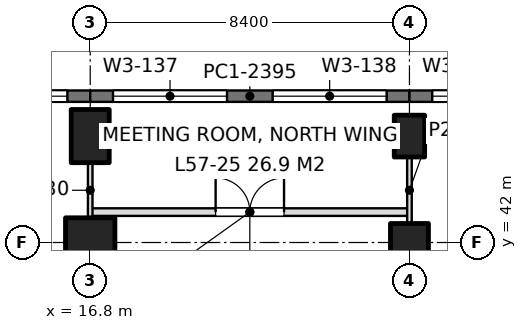
"""IFC4 building model, lengths in metres.
Left out: names, types, materials, properties, quantities, classifications, styles, units other than length and angle.
Written with IfcOpenShell. Run it as: python <this file> out.ifc"""

import sys

from ifc_helpers import new_model, si_unit, direction, frame, frame_2d, origin, origin_2d, place, context, subcontext, project, spatial, rectangle, extrude, element, fill, save


model = new_model("IFC4")
c1 = context("Model", 3, precision=1e-05, world=origin(), true_north=direction((0.0, 1.0)))
c2 = subcontext(c1, "Body", "Model", "MODEL_VIEW")
j1 = project(units=[si_unit("LENGTHUNIT", "METRE"), si_unit("PLANEANGLEUNIT", "RADIAN")], contexts=[c1])
p1 = place(None, origin())
s1 = spatial("IfcSite", under=j1, at=p1, CompositionType="ELEMENT")
p2 = place(p1, origin())
s2 = spatial("IfcBuilding", under=s1, at=p2, CompositionType="ELEMENT")
p3 = place(p2, frame((0.0, 0.0, 250.2)))
s3 = spatial("IfcBuildingStorey", under=s2, at=p3, CompositionType="ELEMENT", Elevation=250.2)
p4 = place(p3, frame((16.8, 42.0, 0.0), z_axis=(0.0, 0.0, 1.0), x_axis=(1.0, 0.0, 0.0)))
e1 = element("IfcColumn", 1, at=p4, inside=s3, PredefinedType="COLUMN", context=c2, shape_type="SweptSolid", body=[
    extrude(rectangle(XDim=1.3, YDim=1.3, at=origin_2d()), origin(), (0.0, 0.0, 1.0), 4.5),
])
p5 = place(p3, frame((16.8, 44.8, 0.0), z_axis=(0.0, 0.0, 1.0), x_axis=(1.0, 0.0, 0.0)))
e2 = element("IfcColumn", 2, at=p5, inside=s3, PredefinedType="COLUMN", context=c2, shape_type="SweptSolid", body=[
    extrude(rectangle(XDim=1.0, YDim=1.4, at=origin_2d()), origin(), (0.0, 0.0, 1.0), 4.5),
])
p6 = place(p3, frame((25.2, 42.0, 0.0), z_axis=(0.0, 0.0, 1.0), x_axis=(1.0, 0.0, 0.0)))
e3 = element("IfcColumn", 3, at=p6, inside=s3, PredefinedType="COLUMN", context=c2, shape_type="SweptSolid", body=[
    extrude(rectangle(XDim=1.0, YDim=1.0, at=origin_2d()), origin(), (0.0, 0.0, 1.0), 4.5),
])
p7 = place(p3, frame((25.2, 44.8, 0.0), z_axis=(0.0, 0.0, 1.0), x_axis=(1.0, 0.0, 0.0)))
e4 = element("IfcColumn", 4, at=p7, inside=s3, PredefinedType="COLUMN", context=c2, shape_type="SweptSolid", body=[
    extrude(rectangle(XDim=0.8, YDim=1.1, at=origin_2d()), origin(), (0.0, 0.0, 1.0), 4.5),
])
p8 = place(p3, frame((8.4, 45.85, 0.0), z_axis=(0.0, 0.0, 1.0), x_axis=(1.0, 0.0, 0.0)))
e5 = element("IfcWall", 5, at=p8, inside=s3, PredefinedType="SOLIDWALL", context=c2, shape_type="SweptSolid", body=[
    extrude(rectangle(XDim=8.4, YDim=0.3, at=frame_2d((4.2, 0.0))), origin(), (0.0, 0.0, 1.0), 4.35),
])
p9 = place(p8, frame((0.6, 0.0, 0.9)))
e6 = element("IfcOpeningElement", 6, at=p9, cuts=e5, PredefinedType="OPENING", context=c2, shape_type="SweptSolid", body=[
    extrude(rectangle(XDim=3.0, YDim=2.4, at=frame_2d((1.5, 1.2))), frame((0.0, 0.16, 0.0), z_axis=(0.0, -1.0, 0.0), x_axis=(1.0, 0.0, 0.0)), (0.0, 0.0, 1.0), 0.32),
])
p10 = place(p8, frame((4.8, 0.0, 0.9)))
e7 = element("IfcOpeningElement", 7, at=p10, cuts=e5, PredefinedType="OPENING", context=c2, shape_type="SweptSolid", body=[
    extrude(rectangle(XDim=3.0, YDim=2.4, at=frame_2d((1.5, 1.2))), frame((0.0, 0.16, 0.0), z_axis=(0.0, -1.0, 0.0), x_axis=(1.0, 0.0, 0.0)), (0.0, 0.0, 1.0), 0.32),
])
p11 = place(p3, frame((16.8, 45.85, 0.0), z_axis=(0.0, 0.0, 1.0), x_axis=(1.0, 0.0, 0.0)))
e8 = element("IfcWall", 8, at=p11, inside=s3, PredefinedType="SOLIDWALL", context=c2, shape_type="SweptSolid", body=[
    extrude(rectangle(XDim=8.4, YDim=0.3, at=frame_2d((4.2, 0.0))), origin(), (0.0, 0.0, 1.0), 4.35),
])
p12 = place(p11, frame((0.6, 0.0, 0.9)))
e9 = element("IfcOpeningElement", 9, at=p12, cuts=e8, PredefinedType="OPENING", context=c2, shape_type="SweptSolid", body=[
    extrude(rectangle(XDim=3.0, YDim=2.4, at=frame_2d((1.5, 1.2))), frame((0.0, 0.16, 0.0), z_axis=(0.0, -1.0, 0.0), x_axis=(1.0, 0.0, 0.0)), (0.0, 0.0, 1.0), 0.32),
])
p13 = place(p11, frame((4.8, 0.0, 0.9)))
e10 = element("IfcOpeningElement", 10, at=p13, cuts=e8, PredefinedType="OPENING", context=c2, shape_type="SweptSolid", body=[
    extrude(rectangle(XDim=3.0, YDim=2.4, at=frame_2d((1.5, 1.2))), frame((0.0, 0.16, 0.0), z_axis=(0.0, -1.0, 0.0), x_axis=(1.0, 0.0, 0.0)), (0.0, 0.0, 1.0), 0.32),
])
p14 = place(p3, frame((25.2, 45.85, 0.0), z_axis=(0.0, 0.0, 1.0), x_axis=(1.0, 0.0, 0.0)))
e11 = element("IfcWall", 11, at=p14, inside=s3, PredefinedType="SOLIDWALL", context=c2, shape_type="SweptSolid", body=[
    extrude(rectangle(XDim=8.4, YDim=0.3, at=frame_2d((4.2, 0.0))), origin(), (0.0, 0.0, 1.0), 4.35),
])
p15 = place(p14, frame((0.6, 0.0, 0.9)))
e12 = element("IfcOpeningElement", 12, at=p15, cuts=e11, PredefinedType="OPENING", context=c2, shape_type="SweptSolid", body=[
    extrude(rectangle(XDim=3.0, YDim=2.4, at=frame_2d((1.5, 1.2))), frame((0.0, 0.16, 0.0), z_axis=(0.0, -1.0, 0.0), x_axis=(1.0, 0.0, 0.0)), (0.0, 0.0, 1.0), 0.32),
])
p16 = place(p14, frame((4.8, 0.0, 0.9)))
e13 = element("IfcOpeningElement", 13, at=p16, cuts=e11, PredefinedType="OPENING", context=c2, shape_type="SweptSolid", body=[
    extrude(rectangle(XDim=3.0, YDim=2.4, at=frame_2d((1.5, 1.2))), frame((0.0, 0.16, 0.0), z_axis=(0.0, -1.0, 0.0), x_axis=(1.0, 0.0, 0.0)), (0.0, 0.0, 1.0), 0.32),
])
p17 = place(p3, frame((16.8, 42.8, 0.0), z_axis=(0.0, 0.0, 1.0), x_axis=(1.0, 0.0, 0.0)))
e14 = element("IfcWall", 14, at=p17, inside=s3, PredefinedType="PARTITIONING", context=c2, shape_type="SweptSolid", body=[
    extrude(rectangle(XDim=8.4, YDim=0.2, at=frame_2d((4.2, 0.0))), origin(), (0.0, 0.0, 1.0), 3.99),
])
p18 = place(p17, frame((3.3, 0.0, 0.0)))
e15 = element("IfcOpeningElement", 15, at=p18, cuts=e14, PredefinedType="OPENING", context=c2, shape_type="SweptSolid", body=[
    extrude(rectangle(XDim=1.8, YDim=2.2, at=frame_2d((0.9, 1.1))), frame((0.0, 0.11, 0.0), z_axis=(0.0, -1.0, 0.0), x_axis=(1.0, 0.0, 0.0)), (0.0, 0.0, 1.0), 0.22),
])
p19 = place(p3, frame((16.8, 42.648, 0.0), z_axis=(0.0, 0.0, 1.0), x_axis=(0.0, 1.0, 0.0)))
e16 = element("IfcWall", 16, at=p19, inside=s3, PredefinedType="PARTITIONING", context=c2, shape_type="SweptSolid", body=[
    extrude(rectangle(XDim=1.453, YDim=0.12, at=frame_2d((0.727, 0.0))), origin(), (0.0, 0.0, 1.0), 3.99),
])
p20 = place(p3, frame((25.2, 42.498, 0.0), z_axis=(0.0, 0.0, 1.0), x_axis=(0.0, 1.0, 0.0)))
e17 = element("IfcWall", 17, at=p20, inside=s3, PredefinedType="PARTITIONING", context=c2, shape_type="SweptSolid", body=[
    extrude(rectangle(XDim=1.753, YDim=0.12, at=frame_2d((0.876, 0.0))), origin(), (0.0, 0.0, 1.0), 3.99),
])
p21 = place(p10, origin())
e18 = element("IfcWindow", 18, at=p21, inside=s3, PartitioningType="SINGLE_PANEL", PredefinedType="WINDOW", context=c2, shape_type="SweptSolid", body=[
    extrude(rectangle(XDim=3.0, YDim=2.4, at=frame_2d((1.5, 1.2))), frame((0.0, 0.03, 0.0), z_axis=(0.0, -1.0, 0.0), x_axis=(1.0, 0.0, 0.0)), (0.0, 0.0, 1.0), 0.06),
])
fill(e7, e18)
p22 = place(p12, origin())
e19 = element("IfcWindow", 19, at=p22, inside=s3, PartitioningType="SINGLE_PANEL", PredefinedType="WINDOW", context=c2, shape_type="SweptSolid", body=[
    extrude(rectangle(XDim=3.0, YDim=2.4, at=frame_2d((1.5, 1.2))), frame((0.0, 0.03, 0.0), z_axis=(0.0, -1.0, 0.0), x_axis=(1.0, 0.0, 0.0)), (0.0, 0.0, 1.0), 0.06),
])
fill(e9, e19)
p23 = place(p13, origin())
e20 = element("IfcWindow", 20, at=p23, inside=s3, PartitioningType="SINGLE_PANEL", PredefinedType="WINDOW", context=c2, shape_type="SweptSolid", body=[
    extrude(rectangle(XDim=3.0, YDim=2.4, at=frame_2d((1.5, 1.2))), frame((0.0, 0.03, 0.0), z_axis=(0.0, -1.0, 0.0), x_axis=(1.0, 0.0, 0.0)), (0.0, 0.0, 1.0), 0.06),
])
fill(e10, e20)
p24 = place(p15, origin())
e21 = element("IfcWindow", 21, at=p24, inside=s3, PartitioningType="SINGLE_PANEL", PredefinedType="WINDOW", context=c2, shape_type="SweptSolid", body=[
    extrude(rectangle(XDim=3.0, YDim=2.4, at=frame_2d((1.5, 1.2))), frame((0.0, 0.03, 0.0), z_axis=(0.0, -1.0, 0.0), x_axis=(1.0, 0.0, 0.0)), (0.0, 0.0, 1.0), 0.06),
])
fill(e12, e21)
p25 = place(p18, origin())
e22 = element("IfcDoor", 22, at=p25, inside=s3, OperationType="DOUBLE_DOOR_SINGLE_SWING", PredefinedType="DOOR", context=c2, shape_type="SweptSolid", body=[
    extrude(rectangle(XDim=1.8, YDim=2.2, at=frame_2d((0.9, 1.1))), frame((0.0, 0.025, 0.0), z_axis=(0.0, -1.0, 0.0), x_axis=(1.0, 0.0, 0.0)), (0.0, 0.0, 1.0), 0.05),
])
fill(e15, e22)
save(model, sys.argv[1])
